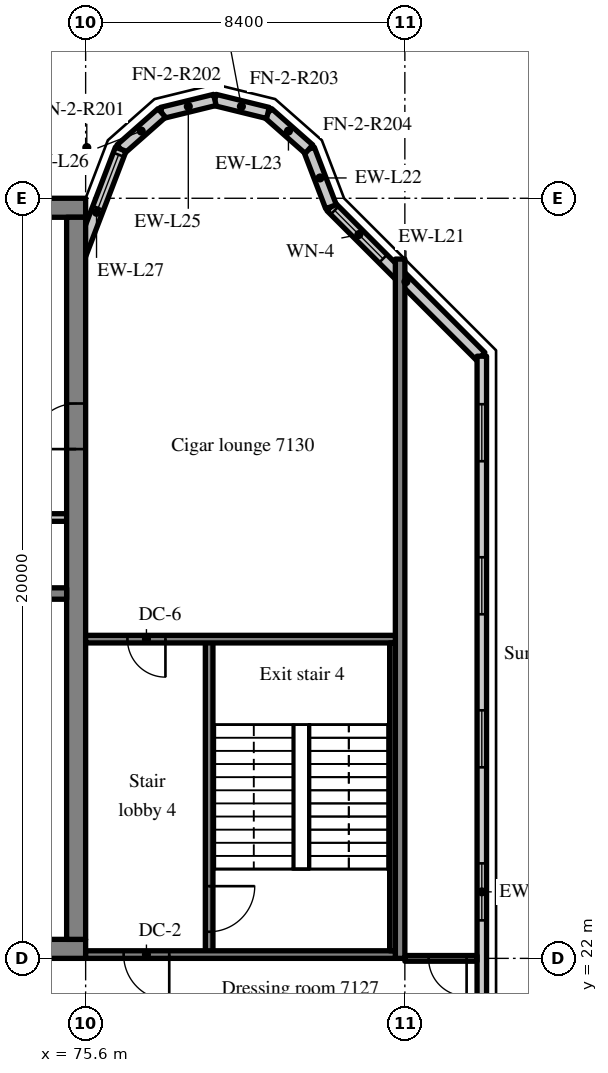
"""IFC4 building model, lengths in metres.
Left out: names, types, materials, properties, quantities, classifications, styles, units other than length and angle.
Written with IfcOpenShell. Run it as: python <this file> out.ifc"""

import sys

from ifc_helpers import new_model, si_unit, direction, frame, frame_2d, origin, place, context, subcontext, project, spatial, rectangle, extrude, source, transform, mapped, element, fill, save


model = new_model("IFC4")
c1 = context("Model", 3, precision=1e-05, world=origin(), true_north=direction((0.0, 1.0)))
c2 = subcontext(c1, "Body", "Model", "MODEL_VIEW")
j1 = project(units=[si_unit("LENGTHUNIT", "METRE"), si_unit("PLANEANGLEUNIT", "RADIAN")], contexts=[c1])
p1 = place(None, origin())
s1 = spatial("IfcSite", under=j1, at=p1, CompositionType="ELEMENT")
p2 = place(p1, origin())
s2 = spatial("IfcBuilding", under=s1, at=p2, CompositionType="ELEMENT")
p3 = place(p2, frame((0.0, 0.0, 297.7)))
s3 = spatial("IfcBuildingStorey", under=s2, at=p3, CompositionType="ELEMENT", Elevation=297.7)
m1 = source(origin(), c2, "Body", "SweptSolid", [
    extrude(rectangle(XDim=50.4, YDim=0.5, at=frame_2d((25.2, 0.0))), origin(), (0.0, 0.0, 1.0), 3.72),
])
p4 = place(p3, frame((25.2, 22.25, 0.0), z_axis=(0.0, 0.0, 1.0), x_axis=(1.0, 0.0, 0.0)))
e1 = element("IfcWall", 1, at=p4, inside=s3, PredefinedType="SHEAR", context=c2, shape_type="MappedRepresentation", body=[
    mapped(m1, transform((0.0, 0.0, 0.0), scale=1.0)),
])
m2 = source(origin(), c2, "Body", "SweptSolid", [
    extrude(rectangle(XDim=1.8, YDim=2.1, at=frame_2d((0.9, 1.05))), frame((0.0, 0.26, 0.0), z_axis=(0.0, -1.0, 0.0), x_axis=(1.0, 0.0, 0.0)), (0.0, 0.0, 1.0), 0.52),
])
p5 = place(p4, frame((15.9, 0.0, 0.0)))
e2 = element("IfcOpeningElement", 2, at=p5, cuts=e1, PredefinedType="OPENING", context=c2, shape_type="MappedRepresentation", body=[
    mapped(m2, transform((0.0, 0.0, 0.0), scale=1.0)),
])
m3 = source(origin(), c2, "Body", "SweptSolid", [
    extrude(rectangle(XDim=0.9, YDim=2.1, at=frame_2d((0.45, 1.05))), frame((0.0, 0.26, 0.0), z_axis=(0.0, -1.0, 0.0), x_axis=(1.0, 0.0, 0.0)), (0.0, 0.0, 1.0), 0.52),
])
p6 = place(p4, frame((9.675, 0.0, 0.0)))
e3 = element("IfcOpeningElement", 3, at=p6, cuts=e1, PredefinedType="OPENING", context=c2, shape_type="MappedRepresentation", body=[
    mapped(m3, transform((0.0, 0.0, 0.0), scale=1.0)),
])
p7 = place(p4, frame((21.525, 0.0, 0.0)))
e4 = element("IfcOpeningElement", 4, at=p7, cuts=e1, PredefinedType="OPENING", context=c2, shape_type="MappedRepresentation", body=[
    mapped(m3, transform((0.0, 0.0, 0.0), scale=1.0)),
])
p8 = place(p4, frame((32.7, 0.0, 0.0)))
e5 = element("IfcOpeningElement", 5, at=p8, cuts=e1, PredefinedType="OPENING", context=c2, shape_type="MappedRepresentation", body=[
    mapped(m2, transform((0.0, 0.0, 0.0), scale=1.0)),
])
m4 = source(origin(), c2, "Body", "SweptSolid", [
    extrude(rectangle(XDim=1.2, YDim=2.1, at=frame_2d((0.6, 1.05))), frame((0.0, 0.26, 0.0), z_axis=(0.0, -1.0, 0.0), x_axis=(1.0, 0.0, 0.0)), (0.0, 0.0, 1.0), 0.52),
])
p9 = place(p4, frame((6.5, 0.0, 0.0)))
e6 = element("IfcOpeningElement", 6, at=p9, cuts=e1, PredefinedType="OPENING", context=c2, shape_type="MappedRepresentation", body=[
    mapped(m4, transform((0.0, 0.0, 0.0), scale=1.0)),
])
p10 = place(p4, frame((47.975, 0.0, 0.0)))
e7 = element("IfcOpeningElement", 7, at=p10, cuts=e1, PredefinedType="OPENING", context=c2, shape_type="MappedRepresentation", body=[
    mapped(m4, transform((0.0, 0.0, 0.0), scale=1.0)),
])
p11 = place(p3, frame((25.2, 41.75, 0.0), z_axis=(0.0, 0.0, 1.0), x_axis=(1.0, 0.0, 0.0)))
e8 = element("IfcWall", 8, at=p11, inside=s3, PredefinedType="SHEAR", context=c2, shape_type="MappedRepresentation", body=[
    mapped(m1, transform((0.0, 0.0, 0.0), scale=1.0)),
])
m5 = source(origin(), c2, "Body", "SweptSolid", [
    extrude(rectangle(XDim=19.0, YDim=0.5, at=frame_2d((9.5, 0.0))), origin(), (0.0, 0.0, 1.0), 3.72),
])
p12 = place(p3, frame((75.35, 22.5, 0.0), z_axis=(0.0, 0.0, 1.0), x_axis=(0.0, 1.0, 0.0)))
e9 = element("IfcWall", 9, at=p12, inside=s3, PredefinedType="SHEAR", context=c2, shape_type="MappedRepresentation", body=[
    mapped(m5, transform((0.0, 0.0, 0.0), scale=1.0)),
])
p13 = place(p12, frame((12.9, 0.0, 0.0)))
e10 = element("IfcOpeningElement", 10, at=p13, cuts=e9, PredefinedType="OPENING", context=c2, shape_type="MappedRepresentation", body=[
    mapped(m4, transform((0.0, 0.0, 0.0), scale=1.0)),
])
m6 = source(origin(), c2, "Body", "SweptSolid", [
    extrude(rectangle(XDim=7.75, YDim=0.3, at=frame_2d((3.875, 0.0))), origin(), (0.0, 0.0, 1.0), 3.72),
])
p14 = place(p3, frame((67.35, 31.6, 0.0), z_axis=(0.0, 0.0, 1.0), x_axis=(1.0, 0.0, 0.0)))
e11 = element("IfcWall", 11, at=p14, inside=s3, PredefinedType="SHEAR", context=c2, shape_type="MappedRepresentation", body=[
    mapped(m6, transform((0.0, 0.0, 0.0), scale=1.0)),
])
m7 = source(origin(), c2, "Body", "SweptSolid", [
    extrude(rectangle(XDim=1.1, YDim=2.1, at=frame_2d((0.55, 1.05))), frame((0.0, 0.16, 0.0), z_axis=(0.0, -1.0, 0.0), x_axis=(1.0, 0.0, 0.0)), (0.0, 0.0, 1.0), 0.32),
])
p15 = place(p14, frame((5.875, 0.0, 0.0)))
e12 = element("IfcOpeningElement", 12, at=p15, cuts=e11, PredefinedType="OPENING", context=c2, shape_type="MappedRepresentation", body=[
    mapped(m7, transform((0.0, 0.0, 0.0), scale=1.0)),
])
m8 = source(origin(), c2, "Body", "SweptSolid", [
    extrude(rectangle(XDim=18.4, YDim=0.25, at=frame_2d((9.2, 0.0))), origin(), (0.0, 0.0, 1.0), 3.72),
])
p16 = place(p3, frame((83.875, 22.0, 0.0), z_axis=(0.0, 0.0, 1.0), x_axis=(0.0, 1.0, 0.0)))
e13 = element("IfcWall", 13, at=p16, inside=s3, PredefinedType="SHEAR", context=c2, shape_type="MappedRepresentation", body=[
    mapped(m8, transform((0.0, 0.0, 0.0), scale=1.0)),
])
m9 = source(origin(), c2, "Body", "SweptSolid", [
    extrude(rectangle(XDim=5.576, YDim=0.3, at=frame_2d((2.788, 0.0))), origin(), (0.0, 0.0, 1.0), 3.72),
])
p17 = place(p3, frame((86.0, 37.834, 0.0), z_axis=(0.0, 0.0, 1.0), x_axis=(-0.707106781187, 0.707106781187, 0.0)))
e14 = element("IfcWall", 14, at=p17, inside=s3, PredefinedType="SOLIDWALL", context=c2, shape_type="MappedRepresentation", body=[
    mapped(m9, transform((0.0, 0.0, 0.0), scale=1.0)),
])
m10 = source(origin(), c2, "Body", "SweptSolid", [
    extrude(rectangle(XDim=1.8, YDim=1.5, at=frame_2d((0.9, 0.75))), frame((0.0, 0.16, 0.0), z_axis=(0.0, -1.0, 0.0), x_axis=(1.0, 0.0, 0.0)), (0.0, 0.0, 1.0), 0.32),
])
p18 = place(p17, frame((3.641, 0.0, 0.9)))
e15 = element("IfcOpeningElement", 15, at=p18, cuts=e14, PredefinedType="OPENING", context=c2, shape_type="MappedRepresentation", body=[
    mapped(m10, transform((0.0, 0.0, 0.0), scale=1.0)),
])
m11 = source(origin(), c2, "Body", "SweptSolid", [
    extrude(rectangle(XDim=1.622, YDim=0.3, at=frame_2d((0.811, 0.0))), origin(), (0.0, 0.0, 1.0), 3.72),
])
p19 = place(p3, frame((82.057, 41.777, 0.0), z_axis=(0.0, 0.0, 1.0), x_axis=(-0.357778527068, 0.933806471154, 0.0)))
e16 = element("IfcWall", 16, at=p19, inside=s3, PredefinedType="SOLIDWALL", context=c2, shape_type="MappedRepresentation", body=[
    mapped(m11, transform((0.0, 0.0, 0.0), scale=1.0)),
])
m12 = source(origin(), c2, "Body", "SweptSolid", [
    extrude(rectangle(XDim=1.44, YDim=0.3, at=frame_2d((0.72, 0.0))), origin(), (0.0, 0.0, 1.0), 3.72),
])
p20 = place(p3, frame((81.477, 43.292, 0.0), z_axis=(0.0, 0.0, 1.0), x_axis=(-0.74957555648, 0.661918790432, 0.0)))
e17 = element("IfcWall", 17, at=p20, inside=s3, PredefinedType="SOLIDWALL", context=c2, shape_type="MappedRepresentation", body=[
    mapped(m12, transform((0.0, 0.0, 0.0), scale=1.0)),
])
m13 = source(origin(), c2, "Body", "SweptSolid", [
    extrude(rectangle(XDim=1.439, YDim=0.3, at=frame_2d((0.719, 0.0))), origin(), (0.0, 0.0, 1.0), 3.72),
])
for number, where, z_axis, x_axis in (
    (18, (80.397, 44.245, 0.0), (0.0, 0.0, 1.0), (-0.971, 0.238, 0.0)),
    (19, (79.0, 44.588, 0.0), (0.0, 0.0, 1.0), (-0.971, -0.238, 0.0)),
):
    element("IfcWall", number, at=place(p3, frame(where, z_axis=z_axis, x_axis=x_axis)), inside=s3, PredefinedType="SOLIDWALL", context=c2, shape_type="MappedRepresentation", body=[
        mapped(m13, transform((0.0, 0.0, 0.0), scale=1.0)),
    ])
p21 = place(p3, frame((77.603, 44.245, 0.0), z_axis=(0.0, 0.0, 1.0), x_axis=(-0.74957555648, -0.661918790432, 0.0)))
e20 = element("IfcWall", 20, at=p21, inside=s3, PredefinedType="SOLIDWALL", context=c2, shape_type="MappedRepresentation", body=[
    mapped(m12, transform((0.0, 0.0, 0.0), scale=1.0)),
])
m14 = source(origin(), c2, "Body", "SweptSolid", [
    extrude(rectangle(XDim=3.559, YDim=0.3, at=frame_2d((1.78, 0.0))), origin(), (0.0, 0.0, 1.0), 3.72),
])
p22 = place(p3, frame((76.523, 43.292, 0.0), z_axis=(0.0, 0.0, 1.0), x_axis=(-0.35779745313, -0.933799219604, 0.0)))
e21 = element("IfcWall", 21, at=p22, inside=s3, PredefinedType="SOLIDWALL", context=c2, shape_type="MappedRepresentation", body=[
    mapped(m14, transform((0.0, 0.0, 0.0), scale=1.0)),
])
m15 = source(origin(), c2, "Body", "SweptSolid", [
    extrude(rectangle(XDim=1.5, YDim=2.0, at=frame_2d((0.75, 1.0))), frame((0.0, 0.16, 0.0), z_axis=(0.0, -1.0, 0.0), x_axis=(1.0, 0.0, 0.0)), (0.0, 0.0, 1.0), 0.32),
])
p23 = place(p22, frame((0.156, 0.0, 0.9)))
e22 = element("IfcOpeningElement", 22, at=p23, cuts=e21, PredefinedType="OPENING", context=c2, shape_type="MappedRepresentation", body=[
    mapped(m15, transform((0.0, 0.0, 0.0), scale=1.0)),
])
m16 = source(origin(), c2, "Body", "SweptSolid", [
    extrude(rectangle(XDim=28.189, YDim=0.25, at=frame_2d((14.095, 0.0))), origin(), (0.0, 0.0, 1.0), 3.72),
])
p24 = place(p3, frame((86.025, 9.655, 0.0), z_axis=(0.0, 0.0, 1.0), x_axis=(0.0, 1.0, 0.0)))
e23 = element("IfcWall", 23, at=p24, inside=s3, PredefinedType="SOLIDWALL", context=c2, shape_type="MappedRepresentation", body=[
    mapped(m16, transform((0.0, 0.0, 0.0), scale=1.0)),
])
m17 = source(origin(), c2, "Body", "SweptSolid", [
    extrude(rectangle(XDim=1.5, YDim=1.5, at=frame_2d((0.75, 0.75))), frame((0.0, 0.135, 0.0), z_axis=(0.0, -1.0, 0.0), x_axis=(1.0, 0.0, 0.0)), (0.0, 0.0, 1.0), 0.27),
])
p25 = place(p24, frame((1.263, 0.0, 0.9)))
e24 = element("IfcOpeningElement", 24, at=p25, cuts=e23, PredefinedType="OPENING", context=c2, shape_type="MappedRepresentation", body=[
    mapped(m17, transform((0.0, 0.0, 0.0), scale=1.0)),
])
p26 = place(p24, frame((5.291, 0.0, 0.9)))
e25 = element("IfcOpeningElement", 25, at=p26, cuts=e23, PredefinedType="OPENING", context=c2, shape_type="MappedRepresentation", body=[
    mapped(m17, transform((0.0, 0.0, 0.0), scale=1.0)),
])
p27 = place(p24, frame((9.318, 0.0, 0.9)))
e26 = element("IfcOpeningElement", 26, at=p27, cuts=e23, PredefinedType="OPENING", context=c2, shape_type="MappedRepresentation", body=[
    mapped(m17, transform((0.0, 0.0, 0.0), scale=1.0)),
])
p28 = place(p24, frame((13.345, 0.0, 0.9)))
e27 = element("IfcOpeningElement", 27, at=p28, cuts=e23, PredefinedType="OPENING", context=c2, shape_type="MappedRepresentation", body=[
    mapped(m17, transform((0.0, 0.0, 0.0), scale=1.0)),
])
p29 = place(p24, frame((17.372, 0.0, 0.9)))
e28 = element("IfcOpeningElement", 28, at=p29, cuts=e23, PredefinedType="OPENING", context=c2, shape_type="MappedRepresentation", body=[
    mapped(m17, transform((0.0, 0.0, 0.0), scale=1.0)),
])
p30 = place(p24, frame((21.399, 0.0, 0.9)))
e29 = element("IfcOpeningElement", 29, at=p30, cuts=e23, PredefinedType="OPENING", context=c2, shape_type="MappedRepresentation", body=[
    mapped(m17, transform((0.0, 0.0, 0.0), scale=1.0)),
])
p31 = place(p24, frame((25.426, 0.0, 0.9)))
e30 = element("IfcOpeningElement", 30, at=p31, cuts=e23, PredefinedType="OPENING", context=c2, shape_type="MappedRepresentation", body=[
    mapped(m17, transform((0.0, 0.0, 0.0), scale=1.0)),
])
m18 = source(origin(), c2, "Body", "SweptSolid", [
    extrude(rectangle(XDim=2.65, YDim=0.2, at=frame_2d((1.325, 0.0))), origin(), (0.0, 0.0, 1.0), 3.72),
])
p32 = place(p3, frame((72.45, 33.6, 0.0), z_axis=(0.0, 0.0, 1.0), x_axis=(1.0, 0.0, 0.0)))
e31 = element("IfcWall", 31, at=p32, inside=s3, PredefinedType="SOLIDWALL", context=c2, shape_type="MappedRepresentation", body=[
    mapped(m18, transform((0.0, 0.0, 0.0), scale=1.0)),
])
m19 = source(origin(), c2, "Body", "SweptSolid", [
    extrude(rectangle(XDim=8.3, YDim=0.2, at=frame_2d((4.15, 0.0))), origin(), (0.0, 0.0, 1.0), 3.72),
])
p33 = place(p3, frame((78.85, 22.1, 0.0), z_axis=(0.0, 0.0, 1.0), x_axis=(0.0, 1.0, 0.0)))
e32 = element("IfcWall", 32, at=p33, inside=s3, PredefinedType="SOLIDWALL", context=c2, shape_type="MappedRepresentation", body=[
    mapped(m19, transform((0.0, 0.0, 0.0), scale=1.0)),
])
m20 = source(origin(), c2, "Body", "SweptSolid", [
    extrude(rectangle(XDim=1.2, YDim=2.1, at=frame_2d((0.6, 1.05))), frame((0.0, 0.11, 0.0), z_axis=(0.0, -1.0, 0.0), x_axis=(1.0, 0.0, 0.0)), (0.0, 0.0, 1.0), 0.22),
])
p34 = place(p33, frame((0.6, 0.0, 0.0)))
e33 = element("IfcOpeningElement", 33, at=p34, cuts=e32, PredefinedType="OPENING", context=c2, shape_type="MappedRepresentation", body=[
    mapped(m20, transform((0.0, 0.0, 0.0), scale=1.0)),
])
m21 = source(origin(), c2, "Body", "SweptSolid", [
    extrude(rectangle(XDim=8.15, YDim=0.2, at=frame_2d((4.075, 0.0))), origin(), (0.0, 0.0, 1.0), 3.72),
])
p35 = place(p3, frame((83.75, 22.1, 0.0), z_axis=(0.0, 0.0, 1.0), x_axis=(-1.0, 0.0, 0.0)))
e34 = element("IfcWall", 34, at=p35, inside=s3, PredefinedType="SOLIDWALL", context=c2, shape_type="MappedRepresentation", body=[
    mapped(m21, transform((0.0, 0.0, 0.0), scale=1.0)),
])
p36 = place(p35, frame((5.95, 0.0, 0.0)))
e35 = element("IfcOpeningElement", 35, at=p36, cuts=e34, PredefinedType="OPENING", context=c2, shape_type="MappedRepresentation", body=[
    mapped(m20, transform((0.0, 0.0, 0.0), scale=1.0)),
])
p37 = place(p3, frame((83.75, 30.4, 0.0), z_axis=(0.0, 0.0, 1.0), x_axis=(-1.0, 0.0, 0.0)))
e36 = element("IfcWall", 36, at=p37, inside=s3, PredefinedType="SOLIDWALL", context=c2, shape_type="MappedRepresentation", body=[
    mapped(m21, transform((0.0, 0.0, 0.0), scale=1.0)),
])
m22 = source(origin(), c2, "Body", "SweptSolid", [
    extrude(rectangle(XDim=1.0, YDim=2.1, at=frame_2d((0.5, 1.05))), frame((0.0, 0.11, 0.0), z_axis=(0.0, -1.0, 0.0), x_axis=(1.0, 0.0, 0.0)), (0.0, 0.0, 1.0), 0.22),
])
p38 = place(p37, frame((6.05, 0.0, 0.0)))
e37 = element("IfcOpeningElement", 37, at=p38, cuts=e36, PredefinedType="OPENING", context=c2, shape_type="MappedRepresentation", body=[
    mapped(m22, transform((0.0, 0.0, 0.0), scale=1.0)),
])
m23 = source(origin(), c2, "Body", "SweptSolid", [
    extrude(rectangle(XDim=8.1, YDim=0.15, at=frame_2d((4.05, 0.0))), origin(), (0.0, 0.0, 1.0), 3.72),
])
p39 = place(p3, frame((83.675, 22.2, 0.0), z_axis=(0.0, 0.0, 1.0), x_axis=(0.0, 1.0, 0.0)))
e38 = element("IfcWall", 38, at=p39, inside=s3, PredefinedType="SOLIDWALL", context=c2, shape_type="MappedRepresentation", body=[
    mapped(m23, transform((0.0, 0.0, 0.0), scale=1.0)),
])
m24 = source(origin(), c2, "Body", "SweptSolid", [
    extrude(rectangle(XDim=1.9, YDim=0.15, at=frame_2d((0.95, 0.0))), origin(), (0.0, 0.0, 1.0), 3.02),
])
p40 = place(p3, frame((84.0, 22.0, 0.0), z_axis=(0.0, 0.0, 1.0), x_axis=(1.0, 0.0, 0.0)))
e39 = element("IfcWall", 39, at=p40, inside=s3, PredefinedType="PARTITIONING", context=c2, shape_type="MappedRepresentation", body=[
    mapped(m24, transform((0.0, 0.0, 0.0), scale=1.0)),
])
m25 = source(origin(), c2, "Body", "SweptSolid", [
    extrude(rectangle(XDim=1.0, YDim=2.1, at=frame_2d((0.5, 1.05))), frame((0.0, 0.085, 0.0), z_axis=(0.0, -1.0, 0.0), x_axis=(1.0, 0.0, 0.0)), (0.0, 0.0, 1.0), 0.17),
])
p41 = place(p40, frame((0.625, 0.0, 0.0)))
e40 = element("IfcOpeningElement", 40, at=p41, cuts=e39, PredefinedType="OPENING", context=c2, shape_type="MappedRepresentation", body=[
    mapped(m25, transform((0.0, 0.0, 0.0), scale=1.0)),
])
m26 = source(origin(), c2, "Body", "SweptSolid", [
    extrude(rectangle(XDim=1.8, YDim=1.5, at=frame_2d((0.9, 0.75))), frame((0.0, 0.03, 0.0), z_axis=(0.0, -1.0, 0.0), x_axis=(1.0, 0.0, 0.0)), (0.0, 0.0, 1.0), 0.06),
])
p42 = place(p18, origin())
e41 = element("IfcWindow", 41, at=p42, inside=s3, PartitioningType="SINGLE_PANEL", PredefinedType="WINDOW", context=c2, shape_type="MappedRepresentation", body=[
    mapped(m26, transform((0.0, 0.0, 0.0), scale=1.0)),
])
fill(e15, e41)
m27 = source(origin(), c2, "Body", "SweptSolid", [
    extrude(rectangle(XDim=1.5, YDim=2.0, at=frame_2d((0.75, 1.0))), frame((0.0, 0.03, 0.0), z_axis=(0.0, -1.0, 0.0), x_axis=(1.0, 0.0, 0.0)), (0.0, 0.0, 1.0), 0.06),
])
p43 = place(p23, origin())
e42 = element("IfcWindow", 42, at=p43, inside=s3, PartitioningType="SINGLE_PANEL", PredefinedType="WINDOW", context=c2, shape_type="MappedRepresentation", body=[
    mapped(m27, transform((0.0, 0.0, 0.0), scale=1.0)),
])
fill(e22, e42)
m28 = source(origin(), c2, "Body", "SweptSolid", [
    extrude(rectangle(XDim=1.5, YDim=1.5, at=frame_2d((0.75, 0.75))), frame((0.0, 0.03, 0.0), z_axis=(0.0, -1.0, 0.0), x_axis=(1.0, 0.0, 0.0)), (0.0, 0.0, 1.0), 0.06),
])
p44 = place(p28, origin())
e43 = element("IfcWindow", 43, at=p44, inside=s3, PartitioningType="SINGLE_PANEL", PredefinedType="WINDOW", context=c2, shape_type="MappedRepresentation", body=[
    mapped(m28, transform((0.0, 0.0, 0.0), scale=1.0)),
])
fill(e27, e43)
p45 = place(p29, origin())
e44 = element("IfcWindow", 44, at=p45, inside=s3, PartitioningType="SINGLE_PANEL", PredefinedType="WINDOW", context=c2, shape_type="MappedRepresentation", body=[
    mapped(m28, transform((0.0, 0.0, 0.0), scale=1.0)),
])
fill(e28, e44)
p46 = place(p30, origin())
e45 = element("IfcWindow", 45, at=p46, inside=s3, PartitioningType="SINGLE_PANEL", PredefinedType="WINDOW", context=c2, shape_type="MappedRepresentation", body=[
    mapped(m28, transform((0.0, 0.0, 0.0), scale=1.0)),
])
fill(e29, e45)
p47 = place(p31, origin())
e46 = element("IfcWindow", 46, at=p47, inside=s3, PartitioningType="SINGLE_PANEL", PredefinedType="WINDOW", context=c2, shape_type="MappedRepresentation", body=[
    mapped(m28, transform((0.0, 0.0, 0.0), scale=1.0)),
])
fill(e30, e46)
m29 = source(origin(), c2, "Body", "SweptSolid", [
    extrude(rectangle(XDim=1.2, YDim=2.1, at=frame_2d((0.6, 1.05))), frame((0.0, 0.025, 0.0), z_axis=(0.0, -1.0, 0.0), x_axis=(1.0, 0.0, 0.0)), (0.0, 0.0, 1.0), 0.05),
])
p48 = place(p13, origin())
e47 = element("IfcDoor", 47, at=p48, inside=s3, OperationType="SINGLE_SWING_LEFT", PredefinedType="DOOR", context=c2, shape_type="MappedRepresentation", body=[
    mapped(m29, transform((0.0, 0.0, 0.0), scale=1.0)),
])
fill(e10, e47)
p49 = place(p34, origin())
e48 = element("IfcDoor", 48, at=p49, inside=s3, OperationType="SINGLE_SWING_RIGHT", PredefinedType="DOOR", context=c2, shape_type="MappedRepresentation", body=[
    mapped(m29, transform((0.0, 0.0, 0.0), scale=1.0)),
])
fill(e33, e48)
p50 = place(p36, origin())
e49 = element("IfcDoor", 49, at=p50, inside=s3, OperationType="SINGLE_SWING_LEFT", PredefinedType="DOOR", context=c2, shape_type="MappedRepresentation", body=[
    mapped(m29, transform((0.0, 0.0, 0.0), scale=1.0)),
])
fill(e35, e49)
m30 = source(origin(), c2, "Body", "SweptSolid", [
    extrude(rectangle(XDim=1.0, YDim=2.1, at=frame_2d((0.5, 1.05))), frame((0.0, 0.025, 0.0), z_axis=(0.0, -1.0, 0.0), x_axis=(1.0, 0.0, 0.0)), (0.0, 0.0, 1.0), 0.05),
])
p51 = place(p38, origin())
e50 = element("IfcDoor", 50, at=p51, inside=s3, OperationType="SINGLE_SWING_LEFT", PredefinedType="DOOR", context=c2, shape_type="MappedRepresentation", body=[
    mapped(m30, transform((0.0, 0.0, 0.0), scale=1.0)),
])
fill(e37, e50)
p52 = place(p41, origin())
e51 = element("IfcDoor", 51, at=p52, inside=s3, OperationType="SINGLE_SWING_RIGHT", PredefinedType="DOOR", context=c2, shape_type="MappedRepresentation", body=[
    mapped(m30, transform((0.0, 0.0, 0.0), scale=1.0)),
])
fill(e40, e51)
save(model, sys.argv[1])
